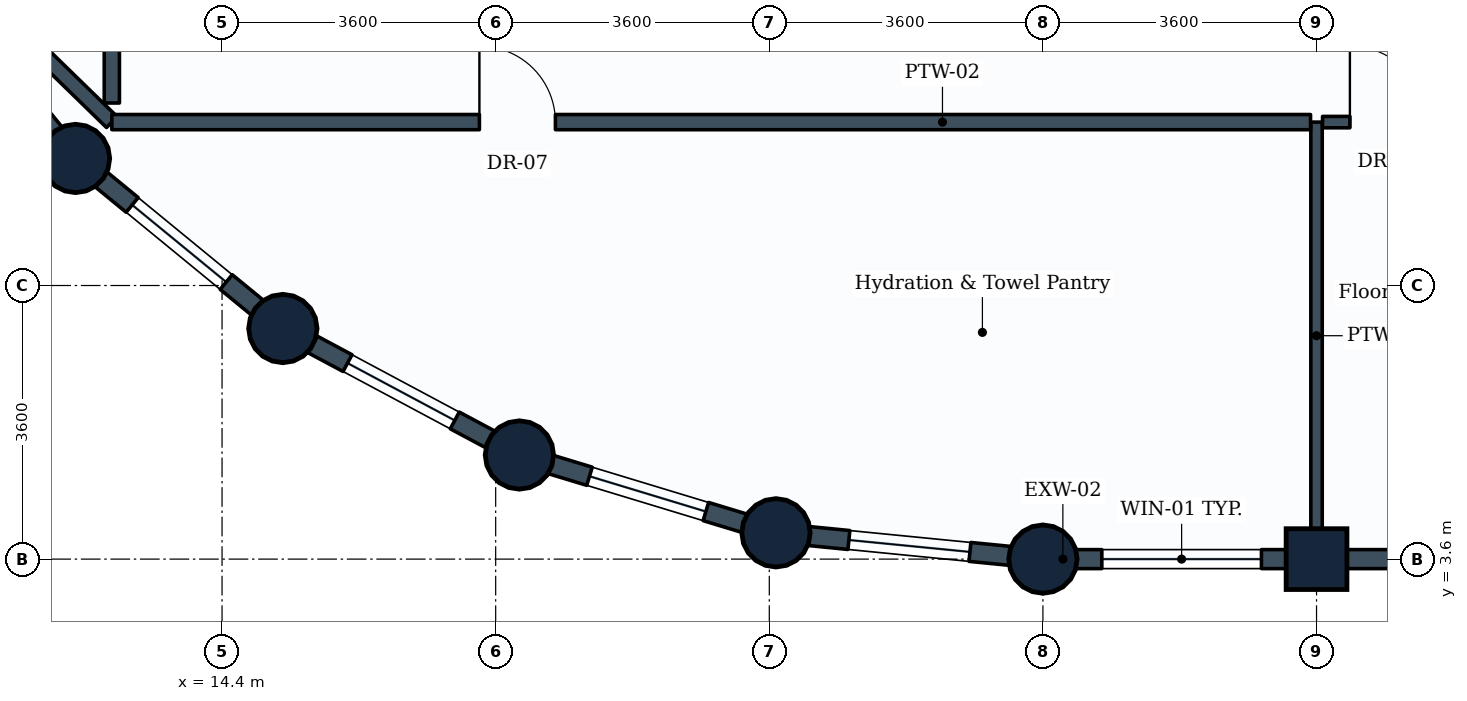
"""IFC4 building model, lengths in metres.
Left out: names, types, materials, properties, quantities, classifications, styles, units other than length and angle.
Written with IfcOpenShell. Run it as: python <this file> out.ifc"""

import sys

from ifc_helpers import new_model, si_unit, direction, frame, frame_2d, origin, origin_2d, place, context, subcontext, project, spatial, rectangle, circle, extrude, element, fill, save


model = new_model("IFC4")
c1 = context("Model", 3, precision=1e-05, world=origin(), true_north=direction((0.0, 1.0)))
c2 = subcontext(c1, "Body", "Model", "MODEL_VIEW")
j1 = project(units=[si_unit("LENGTHUNIT", "METRE"), si_unit("PLANEANGLEUNIT", "RADIAN")], contexts=[c1])
p1 = place(None, origin())
s1 = spatial("IfcSite", under=j1, at=p1, CompositionType="ELEMENT")
p2 = place(p1, origin())
s2 = spatial("IfcBuilding", under=s1, at=p2, CompositionType="ELEMENT")
p3 = place(p2, frame((0.0, 0.0, 255.8)))
s3 = spatial("IfcBuildingStorey", under=s2, at=p3, CompositionType="ELEMENT", Elevation=255.8)
for number, where, z_axis, x_axis in (
    (1, (12.472, 8.872, 0.0), (0.0, 0.0, 1.0), (1.0, 0.0, 0.0)),
    (2, (15.2, 6.634, 0.0), (0.0, 0.0, 1.0), (1.0, 0.0, 0.0)),
    (3, (18.312, 4.97, 0.0), (0.0, 0.0, 1.0), (1.0, 0.0, 0.0)),
    (4, (21.688, 3.946, 0.0), (0.0, 0.0, 1.0), (1.0, 0.0, 0.0)),
    (5, (25.2, 3.6, 0.0), (0.0, 0.0, 1.0), (1.0, 0.0, 0.0)),
):
    element("IfcColumn", number, at=place(p3, frame(where, z_axis=z_axis, x_axis=x_axis)), inside=s3, PredefinedType="COLUMN", context=c2, shape_type="SweptSolid", body=[
        extrude(circle(Radius=0.45, at=origin_2d()), origin(), (0.0, 0.0, 1.0), 3.6),
    ])
p4 = place(p3, frame((28.8, 3.6, 0.0), z_axis=(0.0, 0.0, 1.0), x_axis=(1.0, 0.0, 0.0)))
e6 = element("IfcColumn", 6, at=p4, inside=s3, PredefinedType="COLUMN", context=c2, shape_type="SweptSolid", body=[
    extrude(rectangle(XDim=0.8, YDim=0.8, at=origin_2d()), origin(), (0.0, 0.0, 1.0), 3.6),
])
p5 = place(p3, frame((28.8, 3.6, 0.0), z_axis=(0.0, 0.0, 1.0), x_axis=(-1.0, 0.0, 0.0)))
e7 = element("IfcWall", 7, at=p5, inside=s3, PredefinedType="STANDARD", context=c2, shape_type="SweptSolid", body=[
    extrude(rectangle(XDim=3.6, YDim=0.25, at=frame_2d((1.8, 0.0))), origin(), (0.0, 0.0, 1.0), 2.83),
])
p6 = place(p5, frame((0.725, 0.0, 0.85)))
e8 = element("IfcOpeningElement", 8, at=p6, cuts=e7, PredefinedType="OPENING", context=c2, shape_type="SweptSolid", body=[
    extrude(rectangle(XDim=2.1, YDim=1.35, at=frame_2d((1.05, 0.675))), frame((0.0, 0.135, 0.0), z_axis=(0.0, -1.0, 0.0), x_axis=(1.0, 0.0, 0.0)), (0.0, 0.0, 1.0), 0.27),
])
p7 = place(p3, frame((32.4, 3.6, 0.0), z_axis=(0.0, 0.0, 1.0), x_axis=(-1.0, 0.0, 0.0)))
e9 = element("IfcWall", 9, at=p7, inside=s3, PredefinedType="STANDARD", context=c2, shape_type="SweptSolid", body=[
    extrude(rectangle(XDim=3.6, YDim=0.25, at=frame_2d((1.8, 0.0))), origin(), (0.0, 0.0, 1.0), 2.83),
])
p8 = place(p3, frame((12.472, 8.872, 0.0), z_axis=(0.0, 0.0, 1.0), x_axis=(-0.634258295121, 0.773121216285, 0.0)))
e10 = element("IfcWall", 10, at=p8, inside=s3, PredefinedType="STANDARD", context=c2, shape_type="SweptSolid", body=[
    extrude(rectangle(XDim=3.529, YDim=0.25, at=frame_2d((1.764, 0.0))), origin(), (0.0, 0.0, 1.0), 2.83),
])
p9 = place(p8, frame((0.964, 0.0, 0.85)))
e11 = element("IfcOpeningElement", 11, at=p9, cuts=e10, PredefinedType="OPENING", context=c2, shape_type="SweptSolid", body=[
    extrude(rectangle(XDim=1.6, YDim=1.35, at=frame_2d((0.8, 0.675))), frame((0.0, 0.135, 0.0), z_axis=(0.0, -1.0, 0.0), x_axis=(1.0, 0.0, 0.0)), (0.0, 0.0, 1.0), 0.27),
])
p10 = place(p3, frame((15.2, 6.634, 0.0), z_axis=(0.0, 0.0, 1.0), x_axis=(-0.773121216285, 0.634258295121, 0.0)))
e12 = element("IfcWall", 12, at=p10, inside=s3, PredefinedType="STANDARD", context=c2, shape_type="SweptSolid", body=[
    extrude(rectangle(XDim=3.529, YDim=0.25, at=frame_2d((1.764, 0.0))), origin(), (0.0, 0.0, 1.0), 2.83),
])
p11 = place(p10, frame((0.964, 0.0, 0.85)))
e13 = element("IfcOpeningElement", 13, at=p11, cuts=e12, PredefinedType="OPENING", context=c2, shape_type="SweptSolid", body=[
    extrude(rectangle(XDim=1.6, YDim=1.35, at=frame_2d((0.8, 0.675))), frame((0.0, 0.135, 0.0), z_axis=(0.0, -1.0, 0.0), x_axis=(1.0, 0.0, 0.0)), (0.0, 0.0, 1.0), 0.27),
])
p12 = place(p3, frame((18.312, 4.97, 0.0), z_axis=(0.0, 0.0, 1.0), x_axis=(-0.881846862014, 0.471535907389, 0.0)))
e14 = element("IfcWall", 14, at=p12, inside=s3, PredefinedType="STANDARD", context=c2, shape_type="SweptSolid", body=[
    extrude(rectangle(XDim=3.529, YDim=0.25, at=frame_2d((1.765, 0.0))), origin(), (0.0, 0.0, 1.0), 2.83),
])
p13 = place(p12, frame((0.964, 0.0, 0.85)))
e15 = element("IfcOpeningElement", 15, at=p13, cuts=e14, PredefinedType="OPENING", context=c2, shape_type="SweptSolid", body=[
    extrude(rectangle(XDim=1.6, YDim=1.35, at=frame_2d((0.8, 0.675))), frame((0.0, 0.135, 0.0), z_axis=(0.0, -1.0, 0.0), x_axis=(1.0, 0.0, 0.0)), (0.0, 0.0, 1.0), 0.27),
])
p14 = place(p3, frame((21.688, 3.946, 0.0), z_axis=(0.0, 0.0, 1.0), x_axis=(-0.956953367403, 0.290241714123, 0.0)))
e16 = element("IfcWall", 16, at=p14, inside=s3, PredefinedType="STANDARD", context=c2, shape_type="SweptSolid", body=[
    extrude(rectangle(XDim=3.528, YDim=0.25, at=frame_2d((1.764, 0.0))), origin(), (0.0, 0.0, 1.0), 2.83),
])
p15 = place(p14, frame((0.964, 0.0, 0.85)))
e17 = element("IfcOpeningElement", 17, at=p15, cuts=e16, PredefinedType="OPENING", context=c2, shape_type="SweptSolid", body=[
    extrude(rectangle(XDim=1.6, YDim=1.35, at=frame_2d((0.8, 0.675))), frame((0.0, 0.135, 0.0), z_axis=(0.0, -1.0, 0.0), x_axis=(1.0, 0.0, 0.0)), (0.0, 0.0, 1.0), 0.27),
])
p16 = place(p3, frame((25.2, 3.6, 0.0), z_axis=(0.0, 0.0, 1.0), x_axis=(-0.995183369056, 0.098030923459, 0.0)))
e18 = element("IfcWall", 18, at=p16, inside=s3, PredefinedType="STANDARD", context=c2, shape_type="SweptSolid", body=[
    extrude(rectangle(XDim=3.529, YDim=0.25, at=frame_2d((1.765, 0.0))), origin(), (0.0, 0.0, 1.0), 2.83),
])
p17 = place(p16, frame((0.965, 0.0, 0.85)))
e19 = element("IfcOpeningElement", 19, at=p17, cuts=e18, PredefinedType="OPENING", context=c2, shape_type="SweptSolid", body=[
    extrude(rectangle(XDim=1.6, YDim=1.35, at=frame_2d((0.8, 0.675))), frame((0.0, 0.135, 0.0), z_axis=(0.0, -1.0, 0.0), x_axis=(1.0, 0.0, 0.0)), (0.0, 0.0, 1.0), 0.27),
])
p18 = place(p3, frame((28.8, 9.35, 0.0), z_axis=(0.0, 0.0, 1.0), x_axis=(0.0, -1.0, 0.0)))
e20 = element("IfcWall", 20, at=p18, inside=s3, PredefinedType="PARTITIONING", context=c2, shape_type="SweptSolid", body=[
    extrude(rectangle(XDim=5.621, YDim=0.15, at=frame_2d((2.811, 0.0))), origin(), (0.0, 0.0, 1.0), 3.335),
])
p19 = place(p3, frame((12.95, 9.35, 0.0), z_axis=(0.0, 0.0, 1.0), x_axis=(-0.716473772124, 0.697614029287, 0.0)))
e21 = element("IfcWall", 21, at=p19, inside=s3, PredefinedType="PARTITIONING", context=c2, shape_type="SweptSolid", body=[
    extrude(rectangle(XDim=3.728, YDim=0.2, at=frame_2d((1.864, 0.0))), origin(), (0.0, 0.0, 1.0), 2.83),
])
p20 = place(p3, frame((12.95, 9.601, 0.0), z_axis=(0.0, 0.0, 1.0), x_axis=(0.0, 1.0, 0.0)))
e22 = element("IfcWall", 22, at=p20, inside=s3, PredefinedType="PARTITIONING", context=c2, shape_type="SweptSolid", body=[
    extrude(rectangle(XDim=6.895, YDim=0.2, at=frame_2d((3.447, 0.0))), origin(), (0.0, 0.0, 1.0), 3.03),
])
p21 = place(p20, frame((3.98, 0.0, 0.0)))
e23 = element("IfcOpeningElement", 23, at=p21, cuts=e22, PredefinedType="OPENING", context=c2, shape_type="SweptSolid", body=[
    extrude(rectangle(XDim=1.0, YDim=2.1, at=frame_2d((0.5, 1.05))), frame((0.0, 0.11, 0.0), z_axis=(0.0, -1.0, 0.0), x_axis=(1.0, 0.0, 0.0)), (0.0, 0.0, 1.0), 0.22),
])
p22 = place(p3, frame((12.95, 9.35, 0.0), z_axis=(0.0, 0.0, 1.0), x_axis=(1.0, 0.0, 0.0)))
e24 = element("IfcWall", 24, at=p22, inside=s3, PredefinedType="PARTITIONING", context=c2, shape_type="SweptSolid", body=[
    extrude(rectangle(XDim=15.771, YDim=0.2, at=frame_2d((7.885, 0.0))), origin(), (0.0, 0.0, 1.0), 3.02),
])
p23 = place(p22, frame((4.836, 0.0, 0.0)))
e25 = element("IfcOpeningElement", 25, at=p23, cuts=e24, PredefinedType="OPENING", context=c2, shape_type="SweptSolid", body=[
    extrude(rectangle(XDim=1.0, YDim=2.1, at=frame_2d((0.5, 1.05))), frame((0.0, 0.11, 0.0), z_axis=(0.0, -1.0, 0.0), x_axis=(1.0, 0.0, 0.0)), (0.0, 0.0, 1.0), 0.22),
])
p24 = place(p3, frame((28.879, 9.35, 0.0), z_axis=(0.0, 0.0, 1.0), x_axis=(1.0, 0.0, 0.0)))
e26 = element("IfcWall", 26, at=p24, inside=s3, PredefinedType="PARTITIONING", context=c2, shape_type="SweptSolid", body=[
    extrude(rectangle(XDim=5.521, YDim=0.15, at=frame_2d((2.76, 0.0))), origin(), (0.0, 0.0, 1.0), 3.335),
])
p25 = place(p24, frame((0.36, 0.0, 0.0)))
e27 = element("IfcOpeningElement", 27, at=p25, cuts=e26, PredefinedType="OPENING", context=c2, shape_type="SweptSolid", body=[
    extrude(rectangle(XDim=1.0, YDim=2.1, at=frame_2d((0.5, 1.05))), frame((0.0, 0.085, 0.0), z_axis=(0.0, -1.0, 0.0), x_axis=(1.0, 0.0, 0.0)), (0.0, 0.0, 1.0), 0.17),
])
p26 = place(p6, origin())
e28 = element("IfcWindow", 28, at=p26, inside=s3, PartitioningType="SINGLE_PANEL", PredefinedType="WINDOW", context=c2, shape_type="SweptSolid", body=[
    extrude(rectangle(XDim=2.1, YDim=1.35, at=frame_2d((1.05, 0.675))), frame((0.0, 0.03, 0.0), z_axis=(0.0, -1.0, 0.0), x_axis=(1.0, 0.0, 0.0)), (0.0, 0.0, 1.0), 0.06),
])
fill(e8, e28)
p27 = place(p11, origin())
e29 = element("IfcWindow", 29, at=p27, inside=s3, PartitioningType="SINGLE_PANEL", PredefinedType="WINDOW", context=c2, shape_type="SweptSolid", body=[
    extrude(rectangle(XDim=1.6, YDim=1.35, at=frame_2d((0.8, 0.675))), frame((0.0, 0.03, 0.0), z_axis=(0.0, -1.0, 0.0), x_axis=(1.0, 0.0, 0.0)), (0.0, 0.0, 1.0), 0.06),
])
fill(e13, e29)
p28 = place(p13, origin())
e30 = element("IfcWindow", 30, at=p28, inside=s3, PartitioningType="SINGLE_PANEL", PredefinedType="WINDOW", context=c2, shape_type="SweptSolid", body=[
    extrude(rectangle(XDim=1.6, YDim=1.35, at=frame_2d((0.8, 0.675))), frame((0.0, 0.03, 0.0), z_axis=(0.0, -1.0, 0.0), x_axis=(1.0, 0.0, 0.0)), (0.0, 0.0, 1.0), 0.06),
])
fill(e15, e30)
p29 = place(p15, origin())
e31 = element("IfcWindow", 31, at=p29, inside=s3, PartitioningType="SINGLE_PANEL", PredefinedType="WINDOW", context=c2, shape_type="SweptSolid", body=[
    extrude(rectangle(XDim=1.6, YDim=1.35, at=frame_2d((0.8, 0.675))), frame((0.0, 0.03, 0.0), z_axis=(0.0, -1.0, 0.0), x_axis=(1.0, 0.0, 0.0)), (0.0, 0.0, 1.0), 0.06),
])
fill(e17, e31)
p30 = place(p17, origin())
e32 = element("IfcWindow", 32, at=p30, inside=s3, PartitioningType="SINGLE_PANEL", PredefinedType="WINDOW", context=c2, shape_type="SweptSolid", body=[
    extrude(rectangle(XDim=1.6, YDim=1.35, at=frame_2d((0.8, 0.675))), frame((0.0, 0.03, 0.0), z_axis=(0.0, -1.0, 0.0), x_axis=(1.0, 0.0, 0.0)), (0.0, 0.0, 1.0), 0.06),
])
fill(e19, e32)
p31 = place(p23, origin())
e33 = element("IfcDoor", 33, at=p31, inside=s3, OperationType="SINGLE_SWING_LEFT", PredefinedType="DOOR", context=c2, shape_type="SweptSolid", body=[
    extrude(rectangle(XDim=1.0, YDim=2.1, at=frame_2d((0.5, 1.05))), frame((0.0, 0.025, 0.0), z_axis=(0.0, -1.0, 0.0), x_axis=(1.0, 0.0, 0.0)), (0.0, 0.0, 1.0), 0.05),
])
fill(e25, e33)
p32 = place(p25, origin())
e34 = element("IfcDoor", 34, at=p32, inside=s3, OperationType="SINGLE_SWING_LEFT", PredefinedType="DOOR", context=c2, shape_type="SweptSolid", body=[
    extrude(rectangle(XDim=1.0, YDim=2.1, at=frame_2d((0.5, 1.05))), frame((0.0, 0.025, 0.0), z_axis=(0.0, -1.0, 0.0), x_axis=(1.0, 0.0, 0.0)), (0.0, 0.0, 1.0), 0.05),
])
fill(e27, e34)
save(model, sys.argv[1])
